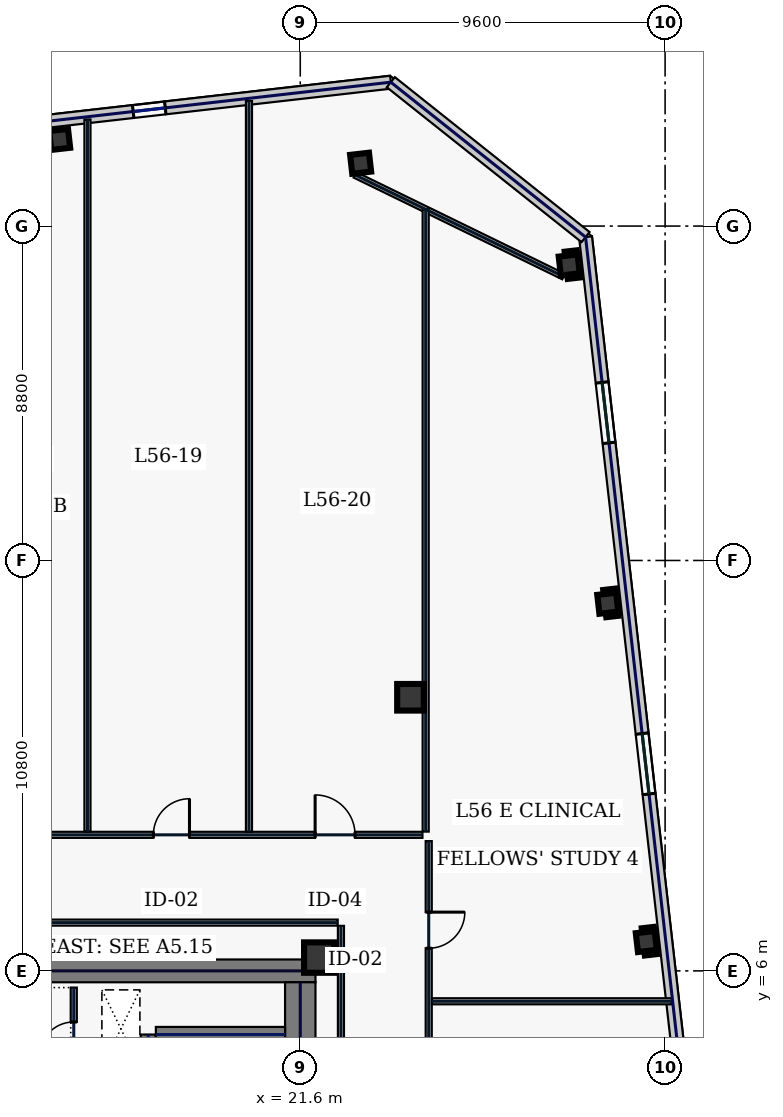
"""IFC4 building model, lengths in metres.
Left out: names, types, materials, properties, quantities, classifications, styles, units other than length and angle.
Written with IfcOpenShell. Run it as: python <this file> out.ifc"""

import sys

from ifc_helpers import new_model, si_unit, direction, frame, frame_2d, origin, origin_2d, place, context, subcontext, project, spatial, rectangle, hollow_rectangle, extrude, element, fill, save


model = new_model("IFC4")
c1 = context("Model", 3, precision=1e-05, world=origin(), true_north=direction((0.0, 1.0)))
c2 = subcontext(c1, "Body", "Model", "MODEL_VIEW")
j1 = project(units=[si_unit("LENGTHUNIT", "METRE"), si_unit("PLANEANGLEUNIT", "RADIAN")], contexts=[c1])
p1 = place(None, origin())
s1 = spatial("IfcSite", under=j1, at=p1, CompositionType="ELEMENT")
p2 = place(p1, origin())
s2 = spatial("IfcBuilding", under=s1, at=p2, CompositionType="ELEMENT")
p3 = place(p2, frame((0.0, 0.0, 243.0)))
s3 = spatial("IfcBuildingStorey", under=s2, at=p3, CompositionType="ELEMENT", Elevation=243.0)
p4 = place(p3, frame((10.5, 6.0, 0.0), z_axis=(0.0, 0.0, 1.0), x_axis=(1.0, 0.0, 0.0)))
e1 = element("IfcWall", 1, at=p4, inside=s3, PredefinedType="SHEAR", context=c2, shape_type="SweptSolid", body=[
    extrude(rectangle(XDim=11.5, YDim=0.6, at=frame_2d((5.75, 0.0))), origin(), (0.0, 0.0, 1.0), 3.74),
])
p5 = place(p3, frame((21.6, -5.7, 0.0), z_axis=(0.0, 0.0, 1.0), x_axis=(0.0, 1.0, 0.0)))
e2 = element("IfcWall", 2, at=p5, inside=s3, PredefinedType="SHEAR", context=c2, shape_type="SweptSolid", body=[
    extrude(rectangle(XDim=11.4, YDim=0.8, at=frame_2d((5.7, 0.0))), origin(), (0.0, 0.0, 1.0), 3.74),
])
p6 = place(p3, frame((17.6, -4.325, 0.0), z_axis=(0.0, 0.0, 1.0), x_axis=(0.0, 1.0, 0.0)))
e3 = element("IfcWall", 3, at=p6, inside=s3, PredefinedType="SHEAR", context=c2, shape_type="SweptSolid", body=[
    extrude(rectangle(XDim=8.65, YDim=0.4, at=frame_2d((4.325, 0.0))), origin(), (0.0, 0.0, 1.0), 3.74),
])
p7 = place(p6, frame((0.25, 0.0, 0.0)))
e4 = element("IfcOpeningElement", 4, at=p7, cuts=e3, PredefinedType="OPENING", context=c2, shape_type="SweptSolid", body=[
    extrude(rectangle(XDim=1.1, YDim=2.2, at=frame_2d((0.55, 1.1))), frame((0.0, 0.21, 0.0), z_axis=(0.0, -1.0, 0.0), x_axis=(1.0, 0.0, 0.0)), (0.0, 0.0, 1.0), 0.42),
])
p8 = place(p3, frame((17.8, 4.325, 0.0), z_axis=(0.0, 0.0, 1.0), x_axis=(1.0, 0.0, 0.0)))
e5 = element("IfcWall", 5, at=p8, inside=s3, PredefinedType="SHEAR", context=c2, shape_type="SweptSolid", body=[
    extrude(rectangle(XDim=3.4, YDim=0.4, at=frame_2d((1.7, 0.0))), origin(), (0.0, 0.0, 1.0), 3.74),
])
p9 = place(p3, frame((22.1, 6.35, 0.0), z_axis=(0.0, 0.0, 1.0), x_axis=(1.0, 0.0, 0.0)))
e6 = element("IfcColumn", 6, at=p9, inside=s3, PredefinedType="COLUMN", context=c2, shape_type="SweptSolid", body=[
    extrude(hollow_rectangle(XDim=0.8, YDim=0.8, WallThickness=0.036, at=origin_2d()), origin(), (0.0, 0.0, 1.0), 3.74),
])
p10 = place(p3, frame((24.5, 13.2, 0.0), z_axis=(0.0, 0.0, 1.0), x_axis=(1.0, 0.0, 0.0)))
e7 = element("IfcColumn", 7, at=p10, inside=s3, PredefinedType="COLUMN", context=c2, shape_type="SweptSolid", body=[
    extrude(hollow_rectangle(XDim=0.7, YDim=0.7, WallThickness=0.032, at=origin_2d()), origin(), (0.0, 0.0, 1.0), 3.74),
])
for number, where, z_axis, x_axis in (
    (8, (23.188, 27.253, 0.0), (0.0, 0.0, 1.0), (0.994, 0.113, 0.0)),
    (9, (15.269, 27.88, 0.0), (0.0, 0.0, 1.0), (0.994, 0.113, 0.0)),
    (10, (30.706, 6.772, 0.0), (0.0, 0.0, 1.0), (0.994, 0.113, 0.0)),
    (11, (29.691, 15.674, 0.0), (0.0, 0.0, 1.0), (0.994, 0.113, 0.0)),
    (12, (28.677, 24.577, 0.0), (0.0, 0.0, 1.0), (0.994, 0.113, 0.0)),
):
    element("IfcColumn", number, at=place(p3, frame(where, z_axis=z_axis, x_axis=x_axis)), inside=s3, PredefinedType="COLUMN", context=c2, shape_type="SweptSolid", body=[
        extrude(hollow_rectangle(XDim=0.5, YDim=0.5, WallThickness=0.025, at=origin_2d()), origin(), (0.0, 0.0, 1.0), 3.74),
    ])
p11 = place(p3, frame((23.983, 29.386, 0.0), z_axis=(0.0, 0.0, 1.0), x_axis=(-0.993572041858, -0.113201579666, 0.0)))
e13 = element("IfcWall", 13, at=p11, inside=s3, PredefinedType="STANDARD", context=c2, shape_type="SweptSolid", body=[
    extrude(rectangle(XDim=14.15, YDim=0.34, at=frame_2d((7.075, 0.0))), origin(), (0.0, 0.0, 1.0), 3.74),
])
p12 = place(p11, frame((10.279, 0.0, 0.83)))
e14 = element("IfcOpeningElement", 14, at=p12, cuts=e13, PredefinedType="OPENING", context=c2, shape_type="SweptSolid", body=[
    extrude(rectangle(XDim=1.5, YDim=2.0, at=frame_2d((0.75, 1.0))), frame((0.0, 0.18, 0.0), z_axis=(0.0, -1.0, 0.0), x_axis=(1.0, 0.0, 0.0)), (0.0, 0.0, 1.0), 0.36),
])
p13 = place(p11, frame((5.973, 0.0, 0.83)))
e15 = element("IfcOpeningElement", 15, at=p13, cuts=e13, PredefinedType="OPENING", context=c2, shape_type="SweptSolid", body=[
    extrude(rectangle(XDim=0.85, YDim=1.85, at=frame_2d((0.425, 0.925))), frame((0.0, 0.18, 0.0), z_axis=(0.0, -1.0, 0.0), x_axis=(1.0, 0.0, 0.0)), (0.0, 0.0, 1.0), 0.36),
])
p14 = place(p3, frame((33.318, -11.651, 0.0), z_axis=(0.0, 0.0, 1.0), x_axis=(-0.11320360501, 0.9935718111, 0.0)))
e16 = element("IfcWall", 16, at=p14, inside=s3, PredefinedType="STANDARD", context=c2, shape_type="SweptSolid", body=[
    extrude(rectangle(XDim=37.2, YDim=0.34, at=frame_2d((18.6, 0.0))), origin(), (0.0, 0.0, 1.0), 3.74),
])
p15 = place(p14, frame((3.85, 0.0, 0.58)))
e17 = element("IfcOpeningElement", 17, at=p15, cuts=e16, PredefinedType="OPENING", context=c2, shape_type="SweptSolid", body=[
    extrude(rectangle(XDim=1.6, YDim=2.3, at=frame_2d((0.8, 1.15))), frame((0.0, 0.18, 0.0), z_axis=(0.0, -1.0, 0.0), x_axis=(1.0, 0.0, 0.0)), (0.0, 0.0, 1.0), 0.36),
])
p16 = place(p14, frame((13.15, 0.0, 0.58)))
e18 = element("IfcOpeningElement", 18, at=p16, cuts=e16, PredefinedType="OPENING", context=c2, shape_type="SweptSolid", body=[
    extrude(rectangle(XDim=1.6, YDim=2.3, at=frame_2d((0.8, 1.15))), frame((0.0, 0.18, 0.0), z_axis=(0.0, -1.0, 0.0), x_axis=(1.0, 0.0, 0.0)), (0.0, 0.0, 1.0), 0.36),
])
p17 = place(p14, frame((22.45, 0.0, 0.58)))
e19 = element("IfcOpeningElement", 19, at=p17, cuts=e16, PredefinedType="OPENING", context=c2, shape_type="SweptSolid", body=[
    extrude(rectangle(XDim=1.6, YDim=2.3, at=frame_2d((0.8, 1.15))), frame((0.0, 0.18, 0.0), z_axis=(0.0, -1.0, 0.0), x_axis=(1.0, 0.0, 0.0)), (0.0, 0.0, 1.0), 0.36),
])
p18 = place(p14, frame((31.75, 0.0, 0.58)))
e20 = element("IfcOpeningElement", 20, at=p18, cuts=e16, PredefinedType="OPENING", context=c2, shape_type="SweptSolid", body=[
    extrude(rectangle(XDim=1.6, YDim=2.3, at=frame_2d((0.8, 1.15))), frame((0.0, 0.18, 0.0), z_axis=(0.0, -1.0, 0.0), x_axis=(1.0, 0.0, 0.0)), (0.0, 0.0, 1.0), 0.36),
])
p19 = place(p3, frame((29.107, 25.31, 0.0), z_axis=(0.0, 0.0, 1.0), x_axis=(-0.78259733853, 0.62252823689, 0.0)))
e21 = element("IfcWall", 21, at=p19, inside=s3, PredefinedType="STANDARD", context=c2, shape_type="SweptSolid", body=[
    extrude(rectangle(XDim=6.548, YDim=0.34, at=frame_2d((3.274, 0.0))), origin(), (0.0, 0.0, 1.0), 3.74),
])
p20 = place(p3, frame((15.64, 3.405, 0.0), z_axis=(0.0, 0.0, 1.0), x_axis=(0.0, 1.0, 0.0)))
e22 = element("IfcWall", 22, at=p20, inside=s3, PredefinedType="PARTITIONING", context=c2, shape_type="SweptSolid", body=[
    extrude(rectangle(XDim=2.155, YDim=0.16, at=frame_2d((1.078, 0.0))), origin(), (0.0, 0.0, 1.0), 3.74),
])
p21 = place(p20, frame((0.35, 0.0, 0.0)))
e23 = element("IfcOpeningElement", 23, at=p21, cuts=e22, PredefinedType="OPENING", context=c2, shape_type="SweptSolid", body=[
    extrude(rectangle(XDim=0.9, YDim=2.2, at=frame_2d((0.45, 1.1))), frame((0.0, 0.09, 0.0), z_axis=(0.0, -1.0, 0.0), x_axis=(1.0, 0.0, 0.0)), (0.0, 0.0, 1.0), 0.18),
])
p22 = place(p3, frame((28.528, 24.271, 0.0), z_axis=(0.0, 0.0, 1.0), x_axis=(-0.898820692789, 0.438316509173, 0.0)))
e24 = element("IfcWall", 24, at=p22, inside=s3, PredefinedType="PARTITIONING", context=c2, shape_type="SweptSolid", body=[
    extrude(rectangle(XDim=6.107, YDim=0.16, at=frame_2d((3.053, 0.0))), origin(), (0.0, 0.0, 1.0), 3.74),
])
p23 = place(p3, frame((-24.815, 9.58, 0.0), z_axis=(0.0, 0.0, 1.0), x_axis=(1.0, 0.0, 0.0)))
e25 = element("IfcWall", 25, at=p23, inside=s3, PredefinedType="PARTITIONING", context=c2, shape_type="SweptSolid", body=[
    extrude(rectangle(XDim=49.63, YDim=0.16, at=frame_2d((24.815, 0.0))), origin(), (0.0, 0.0, 1.0), 3.74),
])
p24 = place(p23, frame((2.044, 0.0, 0.0)))
e26 = element("IfcOpeningElement", 26, at=p24, cuts=e25, PredefinedType="OPENING", context=c2, shape_type="SweptSolid", body=[
    extrude(rectangle(XDim=0.95, YDim=2.2, at=frame_2d((0.475, 1.1))), frame((0.0, 0.09, 0.0), z_axis=(0.0, -1.0, 0.0), x_axis=(1.0, 0.0, 0.0)), (0.0, 0.0, 1.0), 0.18),
])
p25 = place(p23, frame((6.025, 0.0, 0.0)))
e27 = element("IfcOpeningElement", 27, at=p25, cuts=e25, PredefinedType="OPENING", context=c2, shape_type="SweptSolid", body=[
    extrude(rectangle(XDim=1.3, YDim=2.2, at=frame_2d((0.65, 1.1))), frame((0.0, 0.09, 0.0), z_axis=(0.0, -1.0, 0.0), x_axis=(1.0, 0.0, 0.0)), (0.0, 0.0, 1.0), 0.18),
])
p26 = place(p23, frame((10.875, 0.0, 0.0)))
e28 = element("IfcOpeningElement", 28, at=p26, cuts=e25, PredefinedType="OPENING", context=c2, shape_type="SweptSolid", body=[
    extrude(rectangle(XDim=1.3, YDim=2.2, at=frame_2d((0.65, 1.1))), frame((0.0, 0.09, 0.0), z_axis=(0.0, -1.0, 0.0), x_axis=(1.0, 0.0, 0.0)), (0.0, 0.0, 1.0), 0.18),
])
p27 = place(p23, frame((16.25, 0.0, 0.0)))
e29 = element("IfcOpeningElement", 29, at=p27, cuts=e25, PredefinedType="OPENING", context=c2, shape_type="SweptSolid", body=[
    extrude(rectangle(XDim=1.05, YDim=2.2, at=frame_2d((0.525, 1.1))), frame((0.0, 0.09, 0.0), z_axis=(0.0, -1.0, 0.0), x_axis=(1.0, 0.0, 0.0)), (0.0, 0.0, 1.0), 0.18),
])
p28 = place(p23, frame((21.94, 0.0, 0.0)))
e30 = element("IfcOpeningElement", 30, at=p28, cuts=e25, PredefinedType="OPENING", context=c2, shape_type="SweptSolid", body=[
    extrude(rectangle(XDim=0.95, YDim=2.2, at=frame_2d((0.475, 1.1))), frame((0.0, 0.09, 0.0), z_axis=(0.0, -1.0, 0.0), x_axis=(1.0, 0.0, 0.0)), (0.0, 0.0, 1.0), 0.18),
])
p29 = place(p23, frame((29.698, 0.0, 0.0)))
e31 = element("IfcOpeningElement", 31, at=p29, cuts=e25, PredefinedType="OPENING", context=c2, shape_type="SweptSolid", body=[
    extrude(rectangle(XDim=1.45, YDim=2.2, at=frame_2d((0.725, 1.1))), frame((0.0, 0.09, 0.0), z_axis=(0.0, -1.0, 0.0), x_axis=(1.0, 0.0, 0.0)), (0.0, 0.0, 1.0), 0.18),
])
p30 = place(p23, frame((36.683, 0.0, 0.0)))
e32 = element("IfcOpeningElement", 32, at=p30, cuts=e25, PredefinedType="OPENING", context=c2, shape_type="SweptSolid", body=[
    extrude(rectangle(XDim=1.3, YDim=2.2, at=frame_2d((0.65, 1.1))), frame((0.0, 0.09, 0.0), z_axis=(0.0, -1.0, 0.0), x_axis=(1.0, 0.0, 0.0)), (0.0, 0.0, 1.0), 0.18),
])
p31 = place(p23, frame((42.55, 0.0, 0.0)))
e33 = element("IfcOpeningElement", 33, at=p31, cuts=e25, PredefinedType="OPENING", context=c2, shape_type="SweptSolid", body=[
    extrude(rectangle(XDim=0.95, YDim=2.2, at=frame_2d((0.475, 1.1))), frame((0.0, 0.09, 0.0), z_axis=(0.0, -1.0, 0.0), x_axis=(1.0, 0.0, 0.0)), (0.0, 0.0, 1.0), 0.18),
])
p32 = place(p23, frame((46.806, 0.0, 0.0)))
e34 = element("IfcOpeningElement", 34, at=p32, cuts=e25, PredefinedType="OPENING", context=c2, shape_type="SweptSolid", body=[
    extrude(rectangle(XDim=1.05, YDim=2.2, at=frame_2d((0.525, 1.1))), frame((0.0, 0.09, 0.0), z_axis=(0.0, -1.0, 0.0), x_axis=(1.0, 0.0, 0.0)), (0.0, 0.0, 1.0), 0.18),
])
p33 = place(p3, frame((24.98, 9.415, 0.0), z_axis=(0.0, 0.0, 1.0), x_axis=(0.0, -1.0, 0.0)))
e35 = element("IfcWall", 35, at=p33, inside=s3, PredefinedType="PARTITIONING", context=c2, shape_type="SweptSolid", body=[
    extrude(rectangle(XDim=18.63, YDim=0.16, at=frame_2d((9.315, 0.0))), origin(), (0.0, 0.0, 1.0), 3.74),
])
p34 = place(p33, frame((16.081, 0.0, 0.0)))
e36 = element("IfcOpeningElement", 36, at=p34, cuts=e35, PredefinedType="OPENING", context=c2, shape_type="SweptSolid", body=[
    extrude(rectangle(XDim=0.95, YDim=2.2, at=frame_2d((0.475, 1.1))), frame((0.0, 0.09, 0.0), z_axis=(0.0, -1.0, 0.0), x_axis=(1.0, 0.0, 0.0)), (0.0, 0.0, 1.0), 0.18),
])
p35 = place(p33, frame((12.25, 0.0, 0.0)))
e37 = element("IfcOpeningElement", 37, at=p35, cuts=e35, PredefinedType="OPENING", context=c2, shape_type="SweptSolid", body=[
    extrude(rectangle(XDim=0.95, YDim=2.2, at=frame_2d((0.475, 1.1))), frame((0.0, 0.09, 0.0), z_axis=(0.0, -1.0, 0.0), x_axis=(1.0, 0.0, 0.0)), (0.0, 0.0, 1.0), 0.18),
])
p36 = place(p33, frame((7.05, 0.0, 0.0)))
e38 = element("IfcOpeningElement", 38, at=p36, cuts=e35, PredefinedType="OPENING", context=c2, shape_type="SweptSolid", body=[
    extrude(rectangle(XDim=0.95, YDim=2.2, at=frame_2d((0.475, 1.1))), frame((0.0, 0.09, 0.0), z_axis=(0.0, -1.0, 0.0), x_axis=(1.0, 0.0, 0.0)), (0.0, 0.0, 1.0), 0.18),
])
p37 = place(p33, frame((1.869, 0.0, 0.0)))
e39 = element("IfcOpeningElement", 39, at=p37, cuts=e35, PredefinedType="OPENING", context=c2, shape_type="SweptSolid", body=[
    extrude(rectangle(XDim=0.95, YDim=2.2, at=frame_2d((0.475, 1.1))), frame((0.0, 0.09, 0.0), z_axis=(0.0, -1.0, 0.0), x_axis=(1.0, 0.0, 0.0)), (0.0, 0.0, 1.0), 0.18),
])
p38 = place(p3, frame((22.585, 7.27, 0.0), z_axis=(0.0, 0.0, 1.0), x_axis=(-1.0, 0.0, 0.0)))
e40 = element("IfcWall", 40, at=p38, inside=s3, PredefinedType="PARTITIONING", context=c2, shape_type="SweptSolid", body=[
    extrude(rectangle(XDim=11.87, YDim=0.16, at=frame_2d((5.935, 0.0))), origin(), (0.0, 0.0, 1.0), 3.74),
])
p39 = place(p3, frame((22.67, -6.985, 0.0), z_axis=(0.0, 0.0, 1.0), x_axis=(0.0, 1.0, 0.0)))
e41 = element("IfcWall", 41, at=p39, inside=s3, PredefinedType="PARTITIONING", context=c2, shape_type="SweptSolid", body=[
    extrude(rectangle(XDim=14.17, YDim=0.16, at=frame_2d((7.085, 0.0))), origin(), (0.0, 0.0, 1.0), 3.74),
])
p40 = place(p3, frame((24.9, 9.665, 0.0), z_axis=(0.0, 0.0, 1.0), x_axis=(0.0, 1.0, 0.0)))
e42 = element("IfcWall", 42, at=p40, inside=s3, PredefinedType="PARTITIONING", context=c2, shape_type="SweptSolid", body=[
    extrude(rectangle(XDim=16.379, YDim=0.16, at=frame_2d((8.19, 0.0))), origin(), (0.0, 0.0, 1.0), 3.74),
])
p41 = place(p3, frame((16.0, 9.665, 0.0), z_axis=(0.0, 0.0, 1.0), x_axis=(0.0, 1.0, 0.0)))
e43 = element("IfcWall", 43, at=p41, inside=s3, PredefinedType="PARTITIONING", context=c2, shape_type="SweptSolid", body=[
    extrude(rectangle(XDim=18.741, YDim=0.16, at=frame_2d((9.371, 0.0))), origin(), (0.0, 0.0, 1.0), 3.74),
])
p42 = place(p3, frame((20.25, 9.665, 0.0), z_axis=(0.0, 0.0, 1.0), x_axis=(0.0, 1.0, 0.0)))
e44 = element("IfcWall", 44, at=p42, inside=s3, PredefinedType="PARTITIONING", context=c2, shape_type="SweptSolid", body=[
    extrude(rectangle(XDim=19.225, YDim=0.16, at=frame_2d((9.613, 0.0))), origin(), (0.0, 0.0, 1.0), 3.74),
])
p43 = place(p3, frame((25.065, 5.2, 0.0), z_axis=(0.0, 0.0, 1.0), x_axis=(1.0, 0.0, 0.0)))
e45 = element("IfcWall", 45, at=p43, inside=s3, PredefinedType="PARTITIONING", context=c2, shape_type="SweptSolid", body=[
    extrude(rectangle(XDim=6.313, YDim=0.16, at=frame_2d((3.157, 0.0))), origin(), (0.0, 0.0, 1.0), 3.74),
])
p44 = place(p13, origin())
e46 = element("IfcWindow", 46, at=p44, inside=s3, PartitioningType="SINGLE_PANEL", PredefinedType="WINDOW", context=c2, shape_type="SweptSolid", body=[
    extrude(rectangle(XDim=0.85, YDim=1.85, at=frame_2d((0.425, 0.925))), frame((0.0, 0.03, 0.0), z_axis=(0.0, -1.0, 0.0), x_axis=(1.0, 0.0, 0.0)), (0.0, 0.0, 1.0), 0.06),
])
fill(e15, e46)
p45 = place(p17, origin())
e47 = element("IfcWindow", 47, at=p45, inside=s3, PartitioningType="SINGLE_PANEL", PredefinedType="WINDOW", context=c2, shape_type="SweptSolid", body=[
    extrude(rectangle(XDim=1.6, YDim=2.3, at=frame_2d((0.8, 1.15))), frame((0.0, 0.03, 0.0), z_axis=(0.0, -1.0, 0.0), x_axis=(1.0, 0.0, 0.0)), (0.0, 0.0, 1.0), 0.06),
])
fill(e19, e47)
p46 = place(p18, origin())
e48 = element("IfcWindow", 48, at=p46, inside=s3, PartitioningType="SINGLE_PANEL", PredefinedType="WINDOW", context=c2, shape_type="SweptSolid", body=[
    extrude(rectangle(XDim=1.6, YDim=2.3, at=frame_2d((0.8, 1.15))), frame((0.0, 0.03, 0.0), z_axis=(0.0, -1.0, 0.0), x_axis=(1.0, 0.0, 0.0)), (0.0, 0.0, 1.0), 0.06),
])
fill(e20, e48)
p47 = place(p21, origin())
e49 = element("IfcDoor", 49, at=p47, inside=s3, OperationType="SINGLE_SWING_LEFT", PredefinedType="DOOR", context=c2, shape_type="SweptSolid", body=[
    extrude(rectangle(XDim=0.9, YDim=2.2, at=frame_2d((0.45, 1.1))), frame((0.0, 0.025, 0.0), z_axis=(0.0, -1.0, 0.0), x_axis=(1.0, 0.0, 0.0)), (0.0, 0.0, 1.0), 0.05),
])
fill(e23, e49)
p48 = place(p31, origin())
e50 = element("IfcDoor", 50, at=p48, inside=s3, OperationType="SINGLE_SWING_RIGHT", PredefinedType="DOOR", context=c2, shape_type="SweptSolid", body=[
    extrude(rectangle(XDim=0.95, YDim=2.2, at=frame_2d((0.475, 1.1))), frame((0.0, 0.025, 0.0), z_axis=(0.0, -1.0, 0.0), x_axis=(1.0, 0.0, 0.0)), (0.0, 0.0, 1.0), 0.05),
])
fill(e33, e50)
p49 = place(p32, origin())
e51 = element("IfcDoor", 51, at=p49, inside=s3, OperationType="SINGLE_SWING_LEFT", PredefinedType="DOOR", context=c2, shape_type="SweptSolid", body=[
    extrude(rectangle(XDim=1.05, YDim=2.2, at=frame_2d((0.525, 1.1))), frame((0.0, 0.025, 0.0), z_axis=(0.0, -1.0, 0.0), x_axis=(1.0, 0.0, 0.0)), (0.0, 0.0, 1.0), 0.05),
])
fill(e34, e51)
p50 = place(p37, origin())
e52 = element("IfcDoor", 52, at=p50, inside=s3, OperationType="SINGLE_SWING_LEFT", PredefinedType="DOOR", context=c2, shape_type="SweptSolid", body=[
    extrude(rectangle(XDim=0.95, YDim=2.2, at=frame_2d((0.475, 1.1))), frame((0.0, 0.025, 0.0), z_axis=(0.0, -1.0, 0.0), x_axis=(1.0, 0.0, 0.0)), (0.0, 0.0, 1.0), 0.05),
])
fill(e39, e52)
save(model, sys.argv[1])
